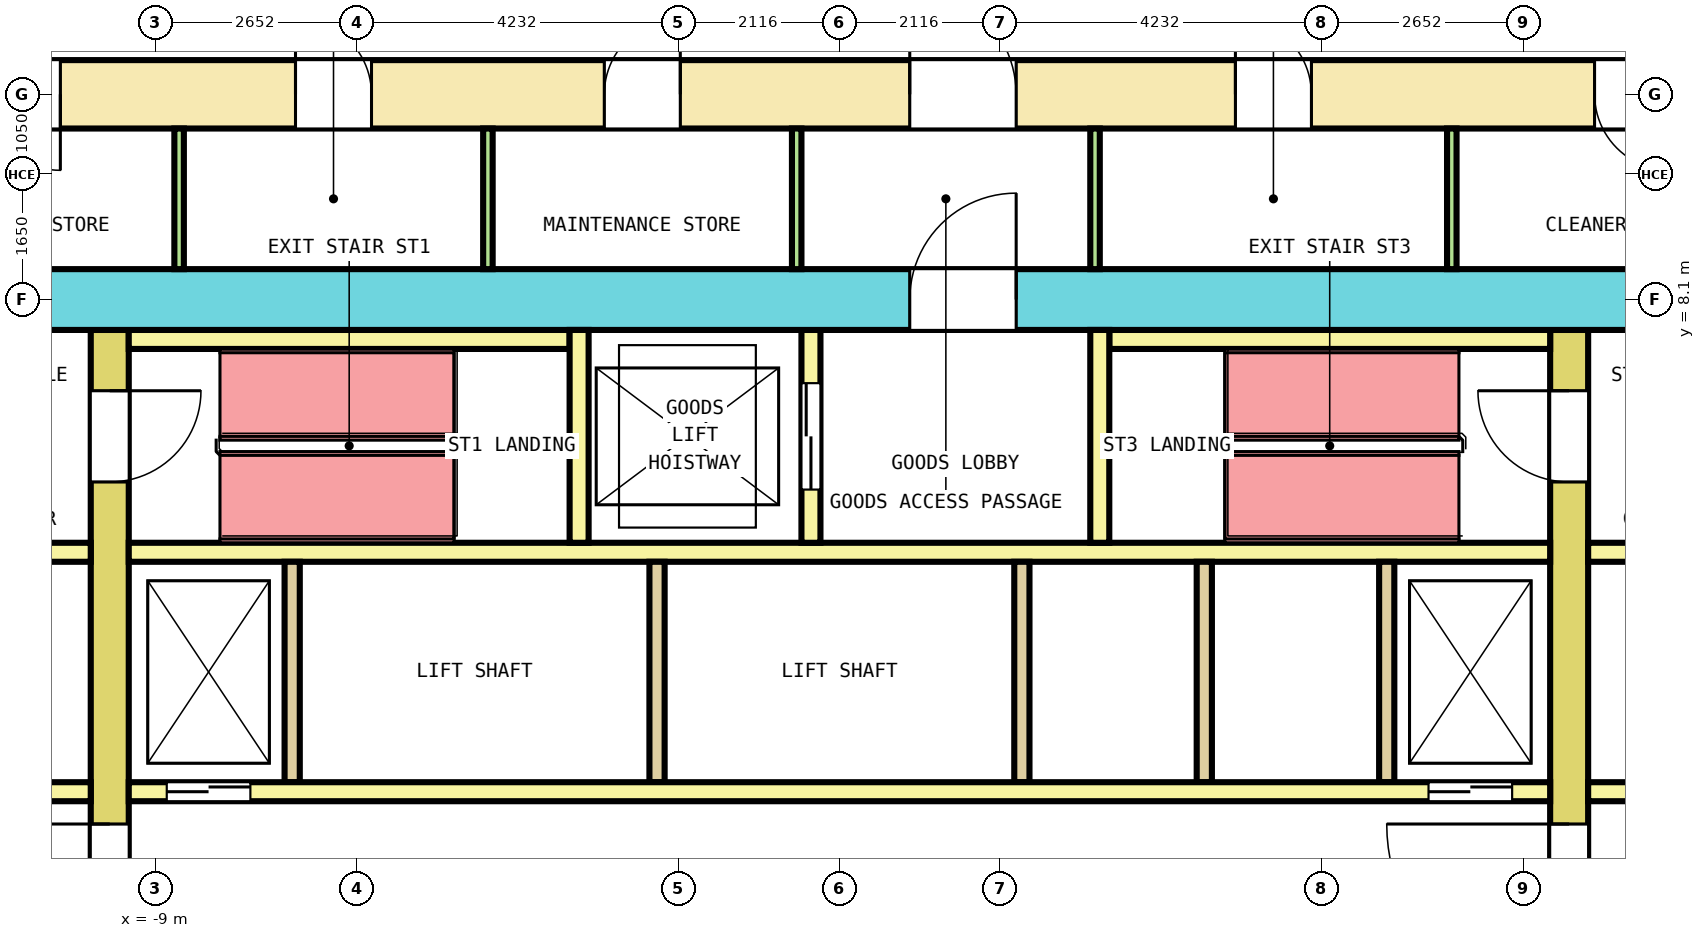
"""IFC4 building model, lengths in metres.
Left out: names, types, materials, properties, quantities, classifications, styles, units other than length and angle.
Written with IfcOpenShell. Run it as: python <this file> out.ifc"""

import sys

from ifc_helpers import new_model, si_unit, direction, frame, frame_2d, origin, place, context, subcontext, project, spatial, rectangle, extrude, element, fill, save


model = new_model("IFC4")
c1 = context("Model", 3, precision=1e-05, world=origin(), true_north=direction((0.0, 1.0)))
c2 = subcontext(c1, "Body", "Model", "MODEL_VIEW")
j1 = project(units=[si_unit("LENGTHUNIT", "METRE"), si_unit("PLANEANGLEUNIT", "RADIAN")], contexts=[c1])
p1 = place(None, origin())
s1 = spatial("IfcSite", under=j1, at=p1, CompositionType="ELEMENT")
p2 = place(p1, origin())
s2 = spatial("IfcBuilding", under=s1, at=p2, CompositionType="ELEMENT")
p3 = place(p2, frame((0.0, 0.0, 27.8)))
s3 = spatial("IfcBuildingStorey", under=s2, at=p3, CompositionType="ELEMENT", Elevation=27.8)
p4 = place(p3, frame((-13.65, 10.8, 0.0), z_axis=(0.0, 0.0, 1.0), x_axis=(1.0, 0.0, 0.0)))
e1 = element("IfcWall", 1, at=p4, inside=s3, PredefinedType="SHEAR", context=c2, shape_type="SweptSolid", body=[
    extrude(rectangle(XDim=27.3, YDim=0.9, at=frame_2d((13.65, 0.0))), origin(), (0.0, 0.0, 1.0), 4.1),
])
p5 = place(p4, frame((2.4, 0.0, 0.0)))
e2 = element("IfcOpeningElement", 2, at=p5, cuts=e1, PredefinedType="OPENING", context=c2, shape_type="SweptSolid", body=[
    extrude(rectangle(XDim=1.0, YDim=2.1, at=frame_2d((0.5, 1.05))), frame((0.0, 0.46, 0.0), z_axis=(0.0, -1.0, 0.0), x_axis=(1.0, 0.0, 0.0)), (0.0, 0.0, 1.0), 0.92),
])
p6 = place(p4, frame((6.494, 0.0, 0.0)))
e3 = element("IfcOpeningElement", 3, at=p6, cuts=e1, PredefinedType="OPENING", context=c2, shape_type="SweptSolid", body=[
    extrude(rectangle(XDim=1.0, YDim=2.1, at=frame_2d((0.5, 1.05))), frame((0.0, 0.46, 0.0), z_axis=(0.0, -1.0, 0.0), x_axis=(1.0, 0.0, 0.0)), (0.0, 0.0, 1.0), 0.92),
])
p7 = place(p4, frame((10.556, 0.0, 0.0)))
e4 = element("IfcOpeningElement", 4, at=p7, cuts=e1, PredefinedType="OPENING", context=c2, shape_type="SweptSolid", body=[
    extrude(rectangle(XDim=1.0, YDim=2.1, at=frame_2d((0.5, 1.05))), frame((0.0, 0.46, 0.0), z_axis=(0.0, -1.0, 0.0), x_axis=(1.0, 0.0, 0.0)), (0.0, 0.0, 1.0), 0.92),
])
p8 = place(p4, frame((18.859, 0.0, 0.0)))
e5 = element("IfcOpeningElement", 5, at=p8, cuts=e1, PredefinedType="OPENING", context=c2, shape_type="SweptSolid", body=[
    extrude(rectangle(XDim=1.0, YDim=2.1, at=frame_2d((0.5, 1.05))), frame((0.0, 0.46, 0.0), z_axis=(0.0, -1.0, 0.0), x_axis=(1.0, 0.0, 0.0)), (0.0, 0.0, 1.0), 0.92),
])
p9 = place(p4, frame((23.584, 0.0, 0.0)))
e6 = element("IfcOpeningElement", 6, at=p9, cuts=e1, PredefinedType="OPENING", context=c2, shape_type="SweptSolid", body=[
    extrude(rectangle(XDim=1.0, YDim=2.1, at=frame_2d((0.5, 1.05))), frame((0.0, 0.46, 0.0), z_axis=(0.0, -1.0, 0.0), x_axis=(1.0, 0.0, 0.0)), (0.0, 0.0, 1.0), 0.92),
])
p10 = place(p4, frame((14.575, 0.0, 0.0)))
e7 = element("IfcOpeningElement", 7, at=p10, cuts=e1, PredefinedType="OPENING", context=c2, shape_type="SweptSolid", body=[
    extrude(rectangle(XDim=1.4, YDim=2.1, at=frame_2d((0.7, 1.05))), frame((0.0, 0.46, 0.0), z_axis=(0.0, -1.0, 0.0), x_axis=(1.0, 0.0, 0.0)), (0.0, 0.0, 1.0), 0.92),
])
p11 = place(p3, frame((-12.75, 8.1, 0.0), z_axis=(0.0, 0.0, 1.0), x_axis=(1.0, 0.0, 0.0)))
e8 = element("IfcWall", 8, at=p11, inside=s3, PredefinedType="SHEAR", context=c2, shape_type="SweptSolid", body=[
    extrude(rectangle(XDim=25.5, YDim=0.8, at=frame_2d((12.75, 0.0))), origin(), (0.0, 0.0, 1.0), 4.1),
])
p12 = place(p11, frame((13.675, 0.0, 0.0)))
e9 = element("IfcOpeningElement", 9, at=p12, cuts=e8, PredefinedType="OPENING", context=c2, shape_type="SweptSolid", body=[
    extrude(rectangle(XDim=1.4, YDim=2.1, at=frame_2d((0.7, 1.05))), frame((0.0, 0.41, 0.0), z_axis=(0.0, -1.0, 0.0), x_axis=(1.0, 0.0, 0.0)), (0.0, 0.0, 1.0), 0.82),
])
p13 = place(p3, frame((-9.6, -7.7, 0.0), z_axis=(0.0, 0.0, 1.0), x_axis=(0.0, 1.0, 0.0)))
e10 = element("IfcWall", 10, at=p13, inside=s3, PredefinedType="SHEAR", context=c2, shape_type="SweptSolid", body=[
    extrude(rectangle(XDim=15.4, YDim=0.5, at=frame_2d((7.7, 0.0))), origin(), (0.0, 0.0, 1.0), 4.1),
])
p14 = place(p13, frame((6.5, 0.0, 0.0)))
e11 = element("IfcOpeningElement", 11, at=p14, cuts=e10, PredefinedType="OPENING", context=c2, shape_type="SweptSolid", body=[
    extrude(rectangle(XDim=2.4, YDim=2.1, at=frame_2d((1.2, 1.05))), frame((0.0, 0.26, 0.0), z_axis=(0.0, -1.0, 0.0), x_axis=(1.0, 0.0, 0.0)), (0.0, 0.0, 1.0), 0.52),
])
p15 = place(p13, frame((13.4, 0.0, 0.0)))
e12 = element("IfcOpeningElement", 12, at=p15, cuts=e10, PredefinedType="OPENING", context=c2, shape_type="SweptSolid", body=[
    extrude(rectangle(XDim=1.2, YDim=2.1, at=frame_2d((0.6, 1.05))), frame((0.0, 0.26, 0.0), z_axis=(0.0, -1.0, 0.0), x_axis=(1.0, 0.0, 0.0)), (0.0, 0.0, 1.0), 0.52),
])
p16 = place(p13, frame((0.8, 0.0, 0.0)))
e13 = element("IfcOpeningElement", 13, at=p16, cuts=e10, PredefinedType="OPENING", context=c2, shape_type="SweptSolid", body=[
    extrude(rectangle(XDim=1.2, YDim=2.1, at=frame_2d((0.6, 1.05))), frame((0.0, 0.26, 0.0), z_axis=(0.0, -1.0, 0.0), x_axis=(1.0, 0.0, 0.0)), (0.0, 0.0, 1.0), 0.52),
])
p17 = place(p3, frame((9.6, -7.7, 0.0), z_axis=(0.0, 0.0, 1.0), x_axis=(0.0, 1.0, 0.0)))
e14 = element("IfcWall", 14, at=p17, inside=s3, PredefinedType="SHEAR", context=c2, shape_type="SweptSolid", body=[
    extrude(rectangle(XDim=15.4, YDim=0.5, at=frame_2d((7.7, 0.0))), origin(), (0.0, 0.0, 1.0), 4.1),
])
p18 = place(p17, frame((6.5, 0.0, 0.0)))
e15 = element("IfcOpeningElement", 15, at=p18, cuts=e14, PredefinedType="OPENING", context=c2, shape_type="SweptSolid", body=[
    extrude(rectangle(XDim=2.4, YDim=2.1, at=frame_2d((1.2, 1.05))), frame((0.0, 0.26, 0.0), z_axis=(0.0, -1.0, 0.0), x_axis=(1.0, 0.0, 0.0)), (0.0, 0.0, 1.0), 0.52),
])
p19 = place(p17, frame((13.4, 0.0, 0.0)))
e16 = element("IfcOpeningElement", 16, at=p19, cuts=e14, PredefinedType="OPENING", context=c2, shape_type="SweptSolid", body=[
    extrude(rectangle(XDim=1.2, YDim=2.1, at=frame_2d((0.6, 1.05))), frame((0.0, 0.26, 0.0), z_axis=(0.0, -1.0, 0.0), x_axis=(1.0, 0.0, 0.0)), (0.0, 0.0, 1.0), 0.52),
])
p20 = place(p17, frame((0.9, 0.0, 0.0)))
e17 = element("IfcOpeningElement", 17, at=p20, cuts=e14, PredefinedType="OPENING", context=c2, shape_type="SweptSolid", body=[
    extrude(rectangle(XDim=1.0, YDim=2.1, at=frame_2d((0.5, 1.05))), frame((0.0, 0.26, 0.0), z_axis=(0.0, -1.0, 0.0), x_axis=(1.0, 0.0, 0.0)), (0.0, 0.0, 1.0), 0.52),
])
p21 = place(p3, frame((-12.75, 1.625, 0.0), z_axis=(0.0, 0.0, 1.0), x_axis=(1.0, 0.0, 0.0)))
e18 = element("IfcWall", 18, at=p21, inside=s3, PredefinedType="SOLIDWALL", context=c2, shape_type="SweptSolid", body=[
    extrude(rectangle(XDim=2.9, YDim=0.25, at=frame_2d((1.45, 0.0))), origin(), (0.0, 0.0, 1.0), 4.1),
])
p22 = place(p21, frame((0.9, 0.0, 0.0)))
e19 = element("IfcOpeningElement", 19, at=p22, cuts=e18, PredefinedType="OPENING", context=c2, shape_type="SweptSolid", body=[
    extrude(rectangle(XDim=1.1, YDim=2.1, at=frame_2d((0.55, 1.05))), frame((0.0, 0.135, 0.0), z_axis=(0.0, -1.0, 0.0), x_axis=(1.0, 0.0, 0.0)), (0.0, 0.0, 1.0), 0.27),
])
p23 = place(p3, frame((-9.35, 1.625, 0.0), z_axis=(0.0, 0.0, 1.0), x_axis=(1.0, 0.0, 0.0)))
e20 = element("IfcWall", 20, at=p23, inside=s3, PredefinedType="SOLIDWALL", context=c2, shape_type="SweptSolid", body=[
    extrude(rectangle(XDim=18.7, YDim=0.25, at=frame_2d((9.35, 0.0))), origin(), (0.0, 0.0, 1.0), 4.1),
])
p24 = place(p23, frame((0.5, 0.0, 0.0)))
e21 = element("IfcOpeningElement", 21, at=p24, cuts=e20, PredefinedType="OPENING", context=c2, shape_type="SweptSolid", body=[
    extrude(rectangle(XDim=1.1, YDim=2.1, at=frame_2d((0.55, 1.05))), frame((0.0, 0.135, 0.0), z_axis=(0.0, -1.0, 0.0), x_axis=(1.0, 0.0, 0.0)), (0.0, 0.0, 1.0), 0.27),
])
p25 = place(p23, frame((17.1, 0.0, 0.0)))
e22 = element("IfcOpeningElement", 22, at=p25, cuts=e20, PredefinedType="OPENING", context=c2, shape_type="SweptSolid", body=[
    extrude(rectangle(XDim=1.1, YDim=2.1, at=frame_2d((0.55, 1.05))), frame((0.0, 0.135, 0.0), z_axis=(0.0, -1.0, 0.0), x_axis=(1.0, 0.0, 0.0)), (0.0, 0.0, 1.0), 0.27),
])
p26 = place(p3, frame((9.85, 1.625, 0.0), z_axis=(0.0, 0.0, 1.0), x_axis=(1.0, 0.0, 0.0)))
e23 = element("IfcWall", 23, at=p26, inside=s3, PredefinedType="SOLIDWALL", context=c2, shape_type="SweptSolid", body=[
    extrude(rectangle(XDim=2.9, YDim=0.25, at=frame_2d((1.45, 0.0))), origin(), (0.0, 0.0, 1.0), 4.1),
])
p27 = place(p26, frame((0.9, 0.0, 0.0)))
e24 = element("IfcOpeningElement", 24, at=p27, cuts=e23, PredefinedType="OPENING", context=c2, shape_type="SweptSolid", body=[
    extrude(rectangle(XDim=1.1, YDim=2.1, at=frame_2d((0.55, 1.05))), frame((0.0, 0.135, 0.0), z_axis=(0.0, -1.0, 0.0), x_axis=(1.0, 0.0, 0.0)), (0.0, 0.0, 1.0), 0.27),
])
p28 = place(p3, frame((-12.75, 4.775, 0.0), z_axis=(0.0, 0.0, 1.0), x_axis=(1.0, 0.0, 0.0)))
e25 = element("IfcWall", 25, at=p28, inside=s3, PredefinedType="SOLIDWALL", context=c2, shape_type="SweptSolid", body=[
    extrude(rectangle(XDim=2.9, YDim=0.25, at=frame_2d((1.45, 0.0))), origin(), (0.0, 0.0, 1.0), 4.1),
])
p29 = place(p3, frame((-9.35, 4.775, 0.0), z_axis=(0.0, 0.0, 1.0), x_axis=(1.0, 0.0, 0.0)))
e26 = element("IfcWall", 26, at=p29, inside=s3, PredefinedType="SOLIDWALL", context=c2, shape_type="SweptSolid", body=[
    extrude(rectangle(XDim=18.7, YDim=0.25, at=frame_2d((9.35, 0.0))), origin(), (0.0, 0.0, 1.0), 4.1),
])
p30 = place(p3, frame((9.85, 4.775, 0.0), z_axis=(0.0, 0.0, 1.0), x_axis=(1.0, 0.0, 0.0)))
e27 = element("IfcWall", 27, at=p30, inside=s3, PredefinedType="SOLIDWALL", context=c2, shape_type="SweptSolid", body=[
    extrude(rectangle(XDim=2.9, YDim=0.25, at=frame_2d((1.45, 0.0))), origin(), (0.0, 0.0, 1.0), 4.1),
])
for number, where, z_axis, x_axis in (
    (28, (-7.2, 1.75, 0.0), (0.0, 0.0, 1.0), (0.0, 1.0, 0.0)),
    (29, (-2.4, 1.75, 0.0), (0.0, 0.0, 1.0), (0.0, 1.0, 0.0)),
    (30, (2.4, 1.75, 0.0), (0.0, 0.0, 1.0), (0.0, 1.0, 0.0)),
    (31, (4.8, 1.75, 0.0), (0.0, 0.0, 1.0), (0.0, 1.0, 0.0)),
    (32, (7.2, 1.75, 0.0), (0.0, 0.0, 1.0), (0.0, 1.0, 0.0)),
):
    element("IfcWall", number, at=place(p3, frame(where, z_axis=z_axis, x_axis=x_axis)), inside=s3, PredefinedType="SOLIDWALL", context=c2, shape_type="SweptSolid", body=[
        extrude(rectangle(XDim=2.9, YDim=0.2, at=frame_2d((1.45, 0.0))), origin(), (0.0, 0.0, 1.0), 4.1),
    ])
for number, where, z_axis, x_axis in (
    (33, (-9.35, 7.575, 0.0), (0.0, 0.0, 1.0), (1.0, 0.0, 0.0)),
    (34, (3.55, 7.575, 0.0), (0.0, 0.0, 1.0), (1.0, 0.0, 0.0)),
):
    element("IfcWall", number, at=place(p3, frame(where, z_axis=z_axis, x_axis=x_axis)), inside=s3, PredefinedType="SOLIDWALL", context=c2, shape_type="SweptSolid", body=[
        extrude(rectangle(XDim=5.8, YDim=0.25, at=frame_2d((2.9, 0.0))), origin(), (0.0, 0.0, 1.0), 4.1),
    ])
p31 = place(p3, frame((-3.425, 4.9, 0.0), z_axis=(0.0, 0.0, 1.0), x_axis=(0.0, 1.0, 0.0)))
e35 = element("IfcWall", 35, at=p31, inside=s3, PredefinedType="SOLIDWALL", context=c2, shape_type="SweptSolid", body=[
    extrude(rectangle(XDim=2.8, YDim=0.25, at=frame_2d((1.4, 0.0))), origin(), (0.0, 0.0, 1.0), 4.1),
])
p32 = place(p3, frame((-0.375, 4.9, 0.0), z_axis=(0.0, 0.0, 1.0), x_axis=(0.0, 1.0, 0.0)))
e36 = element("IfcWall", 36, at=p32, inside=s3, PredefinedType="SOLIDWALL", context=c2, shape_type="SweptSolid", body=[
    extrude(rectangle(XDim=2.8, YDim=0.25, at=frame_2d((1.4, 0.0))), origin(), (0.0, 0.0, 1.0), 4.1),
])
p33 = place(p32, frame((0.7, 0.0, 0.0)))
e37 = element("IfcOpeningElement", 37, at=p33, cuts=e36, PredefinedType="OPENING", context=c2, shape_type="SweptSolid", body=[
    extrude(rectangle(XDim=1.4, YDim=2.1, at=frame_2d((0.7, 1.05))), frame((0.0, 0.135, 0.0), z_axis=(0.0, -1.0, 0.0), x_axis=(1.0, 0.0, 0.0)), (0.0, 0.0, 1.0), 0.27),
])
p34 = place(p3, frame((3.425, 4.9, 0.0), z_axis=(0.0, 0.0, 1.0), x_axis=(0.0, 1.0, 0.0)))
e38 = element("IfcWall", 38, at=p34, inside=s3, PredefinedType="SOLIDWALL", context=c2, shape_type="SweptSolid", body=[
    extrude(rectangle(XDim=2.8, YDim=0.25, at=frame_2d((1.4, 0.0))), origin(), (0.0, 0.0, 1.0), 4.1),
])
for number, where, z_axis, x_axis in (
    (39, (-8.688, 8.5, 0.0), (0.0, 0.0, 1.0), (0.0, 1.0, 0.0)),
    (40, (-4.625, 8.5, 0.0), (0.0, 0.0, 1.0), (0.0, 1.0, 0.0)),
    (41, (-0.562, 8.5, 0.0), (0.0, 0.0, 1.0), (0.0, 1.0, 0.0)),
    (42, (3.363, 8.5, 0.0), (0.0, 0.0, 1.0), (0.0, 1.0, 0.0)),
    (43, (8.056, 8.5, 0.0), (0.0, 0.0, 1.0), (0.0, 1.0, 0.0)),
):
    element("IfcWall", number, at=place(p3, frame(where, z_axis=z_axis, x_axis=x_axis)), inside=s3, PredefinedType="PARTITIONING", context=c2, shape_type="SweptSolid", body=[
        extrude(rectangle(XDim=1.85, YDim=0.125, at=frame_2d((0.925, 0.0))), origin(), (0.0, 0.0, 1.0), 4.1),
    ])
p35 = place(p24, origin())
e44 = element("IfcDoor", 44, at=p35, inside=s3, OperationType="DOUBLE_DOOR_SLIDING", PredefinedType="DOOR", context=c2, shape_type="SweptSolid", body=[
    extrude(rectangle(XDim=1.1, YDim=2.1, at=frame_2d((0.55, 1.05))), frame((0.0, 0.075, 0.0), z_axis=(0.0, -1.0, 0.0), x_axis=(1.0, 0.0, 0.0)), (0.0, 0.0, 1.0), 0.15),
])
fill(e21, e44)
p36 = place(p25, origin())
e45 = element("IfcDoor", 45, at=p36, inside=s3, OperationType="DOUBLE_DOOR_SLIDING", PredefinedType="DOOR", context=c2, shape_type="SweptSolid", body=[
    extrude(rectangle(XDim=1.1, YDim=2.1, at=frame_2d((0.55, 1.05))), frame((0.0, 0.075, 0.0), z_axis=(0.0, -1.0, 0.0), x_axis=(1.0, 0.0, 0.0)), (0.0, 0.0, 1.0), 0.15),
])
fill(e22, e45)
p37 = place(p33, origin())
e46 = element("IfcDoor", 46, at=p37, inside=s3, OperationType="DOUBLE_DOOR_SLIDING", PredefinedType="DOOR", context=c2, shape_type="SweptSolid", body=[
    extrude(rectangle(XDim=1.4, YDim=2.1, at=frame_2d((0.7, 1.05))), frame((0.0, 0.075, 0.0), z_axis=(0.0, -1.0, 0.0), x_axis=(1.0, 0.0, 0.0)), (0.0, 0.0, 1.0), 0.15),
])
fill(e37, e46)
p38 = place(p14, origin())
e47 = element("IfcDoor", 47, at=p38, inside=s3, OperationType="DOUBLE_DOOR_SINGLE_SWING", PredefinedType="DOOR", context=c2, shape_type="SweptSolid", body=[
    extrude(rectangle(XDim=2.4, YDim=2.1, at=frame_2d((1.2, 1.05))), frame((0.0, 0.2, 0.0), z_axis=(0.0, -1.0, 0.0), x_axis=(1.0, 0.0, 0.0)), (0.0, 0.0, 1.0), 0.4),
])
fill(e11, e47)
p39 = place(p18, origin())
e48 = element("IfcDoor", 48, at=p39, inside=s3, OperationType="DOUBLE_DOOR_SINGLE_SWING", PredefinedType="DOOR", context=c2, shape_type="SweptSolid", body=[
    extrude(rectangle(XDim=2.4, YDim=2.1, at=frame_2d((1.2, 1.05))), frame((0.0, 0.2, 0.0), z_axis=(0.0, -1.0, 0.0), x_axis=(1.0, 0.0, 0.0)), (0.0, 0.0, 1.0), 0.4),
])
fill(e15, e48)
p40 = place(p15, origin())
e49 = element("IfcDoor", 49, at=p40, inside=s3, OperationType="SINGLE_SWING_RIGHT", PredefinedType="DOOR", context=c2, shape_type="SweptSolid", body=[
    extrude(rectangle(XDim=1.2, YDim=2.1, at=frame_2d((0.6, 1.05))), frame((0.0, 0.2, 0.0), z_axis=(0.0, -1.0, 0.0), x_axis=(1.0, 0.0, 0.0)), (0.0, 0.0, 1.0), 0.4),
])
fill(e12, e49)
p41 = place(p19, origin())
e50 = element("IfcDoor", 50, at=p41, inside=s3, OperationType="SINGLE_SWING_RIGHT", PredefinedType="DOOR", context=c2, shape_type="SweptSolid", body=[
    extrude(rectangle(XDim=1.2, YDim=2.1, at=frame_2d((0.6, 1.05))), frame((0.0, 0.2, 0.0), z_axis=(0.0, -1.0, 0.0), x_axis=(1.0, 0.0, 0.0)), (0.0, 0.0, 1.0), 0.4),
])
fill(e16, e50)
p42 = place(p12, origin())
e51 = element("IfcDoor", 51, at=p42, inside=s3, OperationType="DOUBLE_DOOR_SINGLE_SWING", PredefinedType="DOOR", context=c2, shape_type="SweptSolid", body=[
    extrude(rectangle(XDim=1.4, YDim=2.1, at=frame_2d((0.7, 1.05))), frame((0.0, 0.3, 0.0), z_axis=(0.0, -1.0, 0.0), x_axis=(1.0, 0.0, 0.0)), (0.0, 0.0, 1.0), 0.6),
])
fill(e9, e51)
p43 = place(p5, origin())
e52 = element("IfcDoor", 52, at=p43, inside=s3, OperationType="SINGLE_SWING_LEFT", PredefinedType="DOOR", context=c2, shape_type="SweptSolid", body=[
    extrude(rectangle(XDim=1.0, YDim=2.1, at=frame_2d((0.5, 1.05))), frame((0.0, 0.3, 0.0), z_axis=(0.0, -1.0, 0.0), x_axis=(1.0, 0.0, 0.0)), (0.0, 0.0, 1.0), 0.6),
])
fill(e2, e52)
p44 = place(p6, origin())
e53 = element("IfcDoor", 53, at=p44, inside=s3, OperationType="SINGLE_SWING_RIGHT", PredefinedType="DOOR", context=c2, shape_type="SweptSolid", body=[
    extrude(rectangle(XDim=1.0, YDim=2.1, at=frame_2d((0.5, 1.05))), frame((0.0, 0.3, 0.0), z_axis=(0.0, -1.0, 0.0), x_axis=(1.0, 0.0, 0.0)), (0.0, 0.0, 1.0), 0.6),
])
fill(e3, e53)
p45 = place(p7, origin())
e54 = element("IfcDoor", 54, at=p45, inside=s3, OperationType="SINGLE_SWING_LEFT", PredefinedType="DOOR", context=c2, shape_type="SweptSolid", body=[
    extrude(rectangle(XDim=1.0, YDim=2.1, at=frame_2d((0.5, 1.05))), frame((0.0, 0.3, 0.0), z_axis=(0.0, -1.0, 0.0), x_axis=(1.0, 0.0, 0.0)), (0.0, 0.0, 1.0), 0.6),
])
fill(e4, e54)
p46 = place(p8, origin())
e55 = element("IfcDoor", 55, at=p46, inside=s3, OperationType="SINGLE_SWING_RIGHT", PredefinedType="DOOR", context=c2, shape_type="SweptSolid", body=[
    extrude(rectangle(XDim=1.0, YDim=2.1, at=frame_2d((0.5, 1.05))), frame((0.0, 0.3, 0.0), z_axis=(0.0, -1.0, 0.0), x_axis=(1.0, 0.0, 0.0)), (0.0, 0.0, 1.0), 0.6),
])
fill(e5, e55)
p47 = place(p9, origin())
e56 = element("IfcDoor", 56, at=p47, inside=s3, OperationType="SINGLE_SWING_LEFT", PredefinedType="DOOR", context=c2, shape_type="SweptSolid", body=[
    extrude(rectangle(XDim=1.0, YDim=2.1, at=frame_2d((0.5, 1.05))), frame((0.0, 0.3, 0.0), z_axis=(0.0, -1.0, 0.0), x_axis=(1.0, 0.0, 0.0)), (0.0, 0.0, 1.0), 0.6),
])
fill(e6, e56)
p48 = place(p10, origin())
e57 = element("IfcDoor", 57, at=p48, inside=s3, OperationType="DOUBLE_DOOR_SINGLE_SWING", PredefinedType="DOOR", context=c2, shape_type="SweptSolid", body=[
    extrude(rectangle(XDim=1.4, YDim=2.1, at=frame_2d((0.7, 1.05))), frame((0.0, 0.3, 0.0), z_axis=(0.0, -1.0, 0.0), x_axis=(1.0, 0.0, 0.0)), (0.0, 0.0, 1.0), 0.6),
])
fill(e7, e57)
save(model, sys.argv[1])
